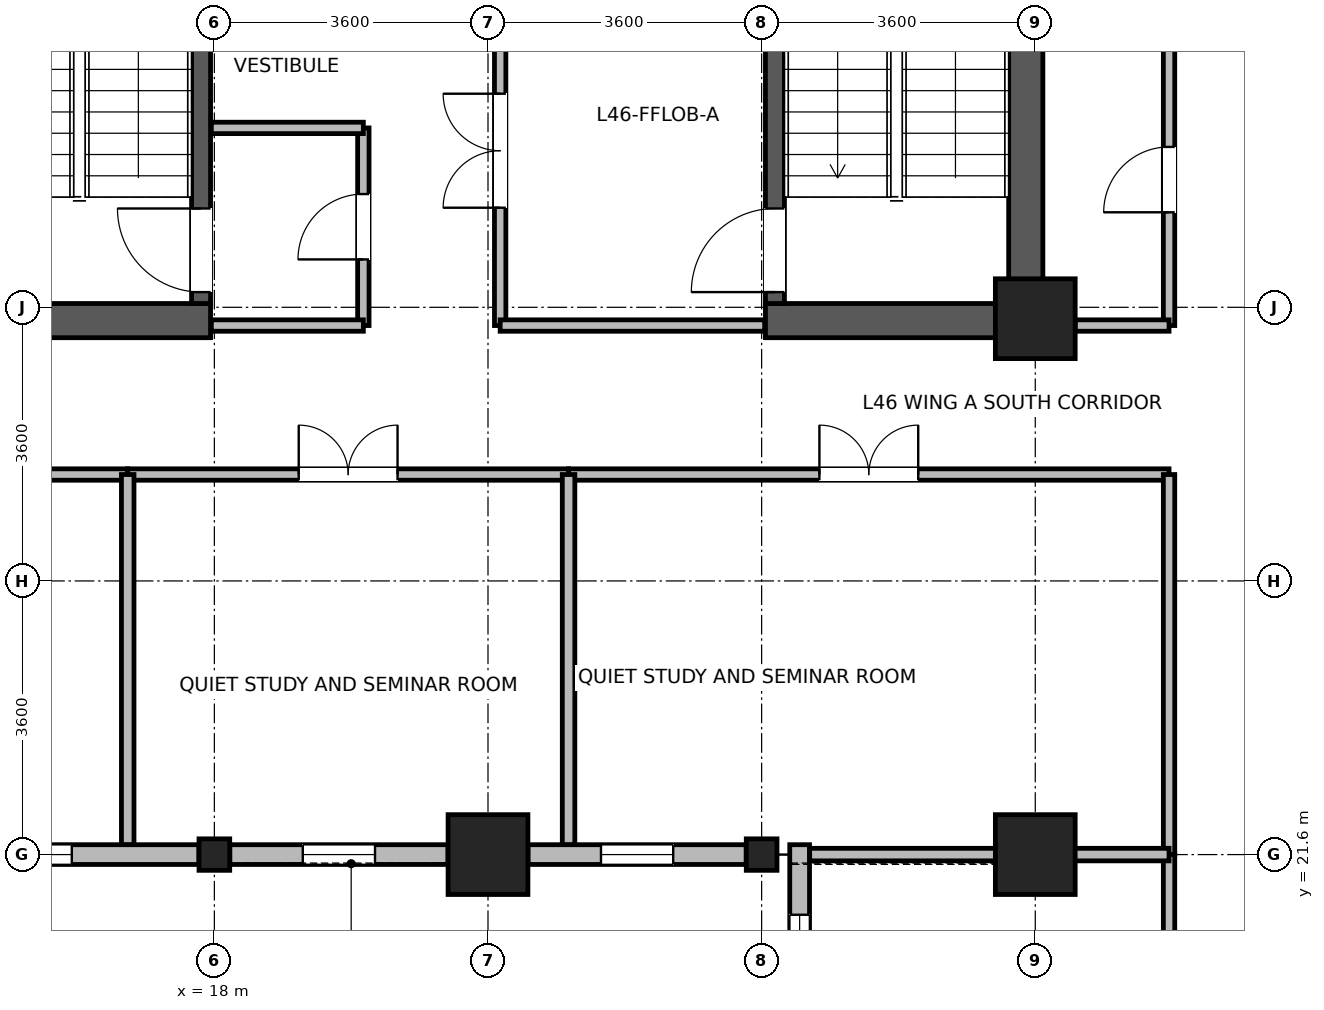
"""IFC4 building model, lengths in metres.
Left out: names, types, materials, properties, quantities, classifications, styles, units other than length and angle.
Written with IfcOpenShell. Run it as: python <this file> out.ifc"""

import sys

from ifc_helpers import new_model, si_unit, direction, frame, frame_2d, origin, origin_2d, place, context, subcontext, project, spatial, rectangle, i_section, extrude, source, transform, mapped, element, fill, save


model = new_model("IFC4")
c1 = context("Model", 3, precision=1e-05, world=origin(), true_north=direction((0.0, 1.0)))
c2 = subcontext(c1, "Body", "Model", "MODEL_VIEW")
j1 = project(units=[si_unit("LENGTHUNIT", "METRE"), si_unit("PLANEANGLEUNIT", "RADIAN")], contexts=[c1])
p1 = place(None, origin())
s1 = spatial("IfcSite", under=j1, at=p1, CompositionType="ELEMENT")
p2 = place(p1, origin())
s2 = spatial("IfcBuilding", under=s1, at=p2, CompositionType="ELEMENT")
p3 = place(p2, frame((0.0, 0.0, 180.9)))
s3 = spatial("IfcBuildingStorey", under=s2, at=p3, CompositionType="ELEMENT", Elevation=180.9)
p4 = place(p3, frame((28.675, 28.4, 0.0), z_axis=(0.0, 0.0, 1.0), x_axis=(0.0, 1.0, 0.0)))
e1 = element("IfcWall", 1, at=p4, inside=s3, PredefinedType="SHEAR", context=c2, shape_type="SweptSolid", body=[
    extrude(rectangle(XDim=7.9, YDim=0.45, at=frame_2d((3.95, 0.0))), origin(), (0.0, 0.0, 1.0), 3.46),
])
for number, where, z_axis, x_axis in (
    (2, (14.75, 28.625, 0.0), (0.0, 0.0, 1.0), (1.0, 0.0, 0.0)),
    (3, (25.25, 28.625, 0.0), (0.0, 0.0, 1.0), (1.0, 0.0, 0.0)),
):
    element("IfcWall", number, at=place(p3, frame(where, z_axis=z_axis, x_axis=x_axis)), inside=s3, PredefinedType="SHEAR", context=c2, shape_type="SweptSolid", body=[
        extrude(rectangle(XDim=3.2, YDim=0.45, at=frame_2d((1.6, 0.0))), origin(), (0.0, 0.0, 1.0), 3.46),
    ])
p5 = place(p3, frame((17.825, 28.85, 0.0), z_axis=(0.0, 0.0, 1.0), x_axis=(0.0, 1.0, 0.0)))
e4 = element("IfcWall", 4, at=p5, inside=s3, PredefinedType="SHEAR", context=c2, shape_type="SweptSolid", body=[
    extrude(rectangle(XDim=7.0, YDim=0.25, at=frame_2d((3.5, 0.0))), origin(), (0.0, 0.0, 1.0), 3.46),
])
p6 = place(p5, frame((0.15, 0.0, 0.0)))
e5 = element("IfcOpeningElement", 5, at=p6, cuts=e4, PredefinedType="OPENING", context=c2, shape_type="SweptSolid", body=[
    extrude(rectangle(XDim=1.1, YDim=2.08, at=frame_2d((0.55, 1.04))), frame((0.0, 0.135, 0.0), z_axis=(0.0, -1.0, 0.0), x_axis=(1.0, 0.0, 0.0)), (0.0, 0.0, 1.0), 0.27),
])
p7 = place(p3, frame((25.375, 28.85, 0.0), z_axis=(0.0, 0.0, 1.0), x_axis=(0.0, 1.0, 0.0)))
e6 = element("IfcWall", 6, at=p7, inside=s3, PredefinedType="SHEAR", context=c2, shape_type="SweptSolid", body=[
    extrude(rectangle(XDim=7.0, YDim=0.25, at=frame_2d((3.5, 0.0))), origin(), (0.0, 0.0, 1.0), 3.46),
])
p8 = place(p7, frame((0.15, 0.0, 0.0)))
e7 = element("IfcOpeningElement", 7, at=p8, cuts=e6, PredefinedType="OPENING", context=c2, shape_type="SweptSolid", body=[
    extrude(rectangle(XDim=1.1, YDim=2.08, at=frame_2d((0.55, 1.04))), frame((0.0, 0.135, 0.0), z_axis=(0.0, -1.0, 0.0), x_axis=(1.0, 0.0, 0.0)), (0.0, 0.0, 1.0), 0.27),
])
m1 = source(origin(), c2, "Body", "SweptSolid", [
    extrude(rectangle(XDim=1.05, YDim=1.05, at=origin_2d()), origin(), (0.0, 0.0, 1.0), 3.7),
])
for number, where, z_axis, x_axis in (
    (8, (21.6, 21.6, 0.0), (0.0, 0.0, 1.0), (1.0, 0.0, 0.0)),
    (9, (28.8, 21.6, 0.0), (0.0, 0.0, 1.0), (1.0, 0.0, 0.0)),
    (10, (28.8, 28.65, 0.0), (0.0, 0.0, 1.0), (1.0, 0.0, 0.0)),
):
    element("IfcColumn", number, at=place(p3, frame(where, z_axis=z_axis, x_axis=x_axis)), inside=s3, PredefinedType="COLUMN", context=c2, shape_type="MappedRepresentation", body=[
        mapped(m1, transform((0.0, 0.0, 0.0), x_axis=(1.0, 0.0, 0.0), y_axis=(0.0, 1.0, 0.0), z_axis=(0.0, 0.0, 1.0), scale=1.0)),
    ])
m2 = source(origin(), c2, "Body", "SweptSolid", [
    extrude(i_section(OverallWidth=0.404, OverallDepth=0.414, WebThickness=0.021, FlangeThickness=0.028, FilletRadius=0.015, at=origin_2d()), origin(), (0.0, 0.0, 1.0), 3.7),
])
for number, where, z_axis, x_axis in (
    (11, (18.0, 21.6, 0.0), (0.0, 0.0, 1.0), (1.0, 0.0, 0.0)),
    (12, (25.2, 21.6, 0.0), (0.0, 0.0, 1.0), (1.0, 0.0, 0.0)),
):
    element("IfcColumn", number, at=place(p3, frame(where, z_axis=z_axis, x_axis=x_axis)), inside=s3, PredefinedType="COLUMN", context=c2, shape_type="MappedRepresentation", body=[
        mapped(m2, transform((0.0, 0.0, 0.0), x_axis=(1.0, 0.0, 0.0), y_axis=(0.0, 1.0, 0.0), z_axis=(0.0, 0.0, 1.0), scale=1.0)),
    ])
p9 = place(p3, frame((17.797, 21.6, 0.0), z_axis=(0.0, 0.0, 1.0), x_axis=(-1.0, 0.0, 0.0)))
e13 = element("IfcWall", 13, at=p9, inside=s3, PredefinedType="STANDARD", context=c2, shape_type="SweptSolid", body=[
    extrude(rectangle(XDim=2.871, YDim=0.26, at=frame_2d((1.436, 0.0))), origin(), (0.0, 0.0, 1.0), 2.99),
])
p10 = place(p9, frame((1.673, 0.0, 0.85)))
e14 = element("IfcOpeningElement", 14, at=p10, cuts=e13, PredefinedType="OPENING", context=c2, shape_type="SweptSolid", body=[
    extrude(rectangle(XDim=0.95, YDim=1.75, at=frame_2d((0.475, 0.875))), frame((0.0, 0.14, 0.0), z_axis=(0.0, -1.0, 0.0), x_axis=(1.0, 0.0, 0.0)), (0.0, 0.0, 1.0), 0.28),
])
p11 = place(p3, frame((21.074, 21.6, 0.0), z_axis=(0.0, 0.0, 1.0), x_axis=(-1.0, 0.0, 0.0)))
e15 = element("IfcWall", 15, at=p11, inside=s3, PredefinedType="STANDARD", context=c2, shape_type="SweptSolid", body=[
    extrude(rectangle(XDim=2.871, YDim=0.26, at=frame_2d((1.436, 0.0))), origin(), (0.0, 0.0, 1.0), 2.99),
])
p12 = place(p11, frame((0.96, 0.0, 0.85)))
e16 = element("IfcOpeningElement", 16, at=p12, cuts=e15, PredefinedType="OPENING", context=c2, shape_type="SweptSolid", body=[
    extrude(rectangle(XDim=0.95, YDim=1.75, at=frame_2d((0.475, 0.875))), frame((0.0, 0.14, 0.0), z_axis=(0.0, -1.0, 0.0), x_axis=(1.0, 0.0, 0.0)), (0.0, 0.0, 1.0), 0.28),
])
p13 = place(p3, frame((24.997, 21.6, 0.0), z_axis=(0.0, 0.0, 1.0), x_axis=(-1.0, 0.0, 0.0)))
e17 = element("IfcWall", 17, at=p13, inside=s3, PredefinedType="STANDARD", context=c2, shape_type="SweptSolid", body=[
    extrude(rectangle(XDim=2.871, YDim=0.26, at=frame_2d((1.436, 0.0))), origin(), (0.0, 0.0, 1.0), 2.99),
])
p14 = place(p13, frame((0.96, 0.0, 0.85)))
e18 = element("IfcOpeningElement", 18, at=p14, cuts=e17, PredefinedType="OPENING", context=c2, shape_type="SweptSolid", body=[
    extrude(rectangle(XDim=0.95, YDim=1.75, at=frame_2d((0.475, 0.875))), frame((0.0, 0.14, 0.0), z_axis=(0.0, -1.0, 0.0), x_axis=(1.0, 0.0, 0.0)), (0.0, 0.0, 1.0), 0.28),
])
p15 = place(p3, frame((25.7, 1.67, 0.0), z_axis=(0.0, 0.0, 1.0), x_axis=(0.0, 1.0, 0.0)))
e19 = element("IfcWall", 19, at=p15, inside=s3, PredefinedType="STANDARD", context=c2, shape_type="SweptSolid", body=[
    extrude(rectangle(XDim=20.06, YDim=0.26, at=frame_2d((10.03, 0.0))), origin(), (0.0, 0.0, 1.0), 3.44),
])
p16 = place(p15, frame((0.922, 0.0, 0.85)))
e20 = element("IfcOpeningElement", 20, at=p16, cuts=e19, PredefinedType="OPENING", context=c2, shape_type="SweptSolid", body=[
    extrude(rectangle(XDim=1.5, YDim=1.85, at=frame_2d((0.75, 0.925))), frame((0.0, 0.14, 0.0), z_axis=(0.0, -1.0, 0.0), x_axis=(1.0, 0.0, 0.0)), (0.0, 0.0, 1.0), 0.28),
])
p17 = place(p15, frame((7.608, 0.0, 0.85)))
e21 = element("IfcOpeningElement", 21, at=p17, cuts=e19, PredefinedType="OPENING", context=c2, shape_type="SweptSolid", body=[
    extrude(rectangle(XDim=1.5, YDim=1.85, at=frame_2d((0.75, 0.925))), frame((0.0, 0.14, 0.0), z_axis=(0.0, -1.0, 0.0), x_axis=(1.0, 0.0, 0.0)), (0.0, 0.0, 1.0), 0.28),
])
p18 = place(p15, frame((10.952, 0.0, 0.85)))
e22 = element("IfcOpeningElement", 22, at=p18, cuts=e19, PredefinedType="OPENING", context=c2, shape_type="SweptSolid", body=[
    extrude(rectangle(XDim=1.5, YDim=1.85, at=frame_2d((0.75, 0.925))), frame((0.0, 0.14, 0.0), z_axis=(0.0, -1.0, 0.0), x_axis=(1.0, 0.0, 0.0)), (0.0, 0.0, 1.0), 0.28),
])
p19 = place(p15, frame((14.295, 0.0, 0.85)))
e23 = element("IfcOpeningElement", 23, at=p19, cuts=e19, PredefinedType="OPENING", context=c2, shape_type="SweptSolid", body=[
    extrude(rectangle(XDim=1.5, YDim=1.85, at=frame_2d((0.75, 0.925))), frame((0.0, 0.14, 0.0), z_axis=(0.0, -1.0, 0.0), x_axis=(1.0, 0.0, 0.0)), (0.0, 0.0, 1.0), 0.28),
])
p20 = place(p15, frame((17.638, 0.0, 0.85)))
e24 = element("IfcOpeningElement", 24, at=p20, cuts=e19, PredefinedType="OPENING", context=c2, shape_type="SweptSolid", body=[
    extrude(rectangle(XDim=1.5, YDim=1.85, at=frame_2d((0.75, 0.925))), frame((0.0, 0.14, 0.0), z_axis=(0.0, -1.0, 0.0), x_axis=(1.0, 0.0, 0.0)), (0.0, 0.0, 1.0), 0.28),
])
p21 = place(p3, frame((6.54, 26.6, 0.0), z_axis=(0.0, 0.0, 1.0), x_axis=(1.0, 0.0, 0.0)))
e25 = element("IfcWall", 25, at=p21, inside=s3, PredefinedType="PARTITIONING", context=c2, shape_type="SweptSolid", body=[
    extrude(rectangle(XDim=10.32, YDim=0.15, at=frame_2d((5.16, 0.0))), origin(), (0.0, 0.0, 1.0), 3.44),
])
p22 = place(p21, frame((4.51, 0.0, 0.0)))
e26 = element("IfcOpeningElement", 26, at=p22, cuts=e25, PredefinedType="OPENING", context=c2, shape_type="SweptSolid", body=[
    extrude(rectangle(XDim=1.3, YDim=2.12, at=frame_2d((0.65, 1.06))), frame((0.0, 0.085, 0.0), z_axis=(0.0, -1.0, 0.0), x_axis=(1.0, 0.0, 0.0)), (0.0, 0.0, 1.0), 0.17),
])
p23 = place(p3, frame((22.66, 26.6, 0.0), z_axis=(0.0, 0.0, 1.0), x_axis=(1.0, 0.0, 0.0)))
e27 = element("IfcWall", 27, at=p23, inside=s3, PredefinedType="PARTITIONING", context=c2, shape_type="SweptSolid", body=[
    extrude(rectangle(XDim=7.9, YDim=0.15, at=frame_2d((3.95, 0.0))), origin(), (0.0, 0.0, 1.0), 3.44),
])
p24 = place(p23, frame((3.3, 0.0, 0.0)))
e28 = element("IfcOpeningElement", 28, at=p24, cuts=e27, PredefinedType="OPENING", context=c2, shape_type="SweptSolid", body=[
    extrude(rectangle(XDim=1.3, YDim=2.12, at=frame_2d((0.65, 1.06))), frame((0.0, 0.085, 0.0), z_axis=(0.0, -1.0, 0.0), x_axis=(1.0, 0.0, 0.0)), (0.0, 0.0, 1.0), 0.17),
])
p25 = place(p3, frame((30.56, 14.5, 0.0), z_axis=(0.0, 0.0, 1.0), x_axis=(0.0, 1.0, 0.0)))
e29 = element("IfcWall", 29, at=p25, inside=s3, PredefinedType="PARTITIONING", context=c2, shape_type="SweptSolid", body=[
    extrude(rectangle(XDim=7.1, YDim=0.15, at=frame_2d((3.55, 0.0))), origin(), (0.0, 0.0, 1.0), 3.44),
])
p26 = place(p25, frame((2.9, 0.0, 0.0)))
e30 = element("IfcOpeningElement", 30, at=p26, cuts=e29, PredefinedType="OPENING", context=c2, shape_type="SweptSolid", body=[
    extrude(rectangle(XDim=1.3, YDim=2.12, at=frame_2d((0.65, 1.06))), frame((0.0, 0.085, 0.0), z_axis=(0.0, -1.0, 0.0), x_axis=(1.0, 0.0, 0.0)), (0.0, 0.0, 1.0), 0.17),
])
p27 = place(p3, frame((16.86, 26.6, 0.0), z_axis=(0.0, 0.0, 1.0), x_axis=(1.0, 0.0, 0.0)))
e31 = element("IfcWall", 31, at=p27, inside=s3, PredefinedType="PARTITIONING", context=c2, shape_type="SweptSolid", body=[
    extrude(rectangle(XDim=5.8, YDim=0.15, at=frame_2d((2.9, 0.0))), origin(), (0.0, 0.0, 1.0), 3.44),
])
p28 = place(p27, frame((2.25, 0.0, 0.0)))
e32 = element("IfcOpeningElement", 32, at=p28, cuts=e31, PredefinedType="OPENING", context=c2, shape_type="SweptSolid", body=[
    extrude(rectangle(XDim=1.3, YDim=2.12, at=frame_2d((0.65, 1.06))), frame((0.0, 0.085, 0.0), z_axis=(0.0, -1.0, 0.0), x_axis=(1.0, 0.0, 0.0)), (0.0, 0.0, 1.0), 0.17),
])
p29 = place(p3, frame((30.56, 21.6, 0.0), z_axis=(0.0, 0.0, 1.0), x_axis=(0.0, 1.0, 0.0)))
e33 = element("IfcWall", 33, at=p29, inside=s3, PredefinedType="PARTITIONING", context=c2, shape_type="SweptSolid", body=[
    extrude(rectangle(XDim=5.0, YDim=0.15, at=frame_2d((2.5, 0.0))), origin(), (0.0, 0.0, 1.0), 3.44),
])
p30 = place(p3, frame((30.56, 28.56, 0.0), z_axis=(0.0, 0.0, 1.0), x_axis=(0.0, 1.0, 0.0)))
e34 = element("IfcWall", 34, at=p30, inside=s3, PredefinedType="PARTITIONING", context=c2, shape_type="SweptSolid", body=[
    extrude(rectangle(XDim=3.84, YDim=0.15, at=frame_2d((1.92, 0.0))), origin(), (0.0, 0.0, 1.0), 3.44),
])
p31 = place(p30, frame((1.49, 0.0, 0.0)))
e35 = element("IfcOpeningElement", 35, at=p31, cuts=e34, PredefinedType="OPENING", context=c2, shape_type="SweptSolid", body=[
    extrude(rectangle(XDim=0.86, YDim=2.02, at=frame_2d((0.43, 1.01))), frame((0.0, 0.085, 0.0), z_axis=(0.0, -1.0, 0.0), x_axis=(1.0, 0.0, 0.0)), (0.0, 0.0, 1.0), 0.17),
])
p32 = place(p3, frame((19.96, 28.56, 0.0), z_axis=(0.0, 0.0, 1.0), x_axis=(0.0, 1.0, 0.0)))
e36 = element("IfcWall", 36, at=p32, inside=s3, PredefinedType="PARTITIONING", context=c2, shape_type="SweptSolid", body=[
    extrude(rectangle(XDim=2.6, YDim=0.15, at=frame_2d((1.3, 0.0))), origin(), (0.0, 0.0, 1.0), 3.44),
])
p33 = place(p32, frame((0.87, 0.0, 0.0)))
e37 = element("IfcOpeningElement", 37, at=p33, cuts=e36, PredefinedType="OPENING", context=c2, shape_type="SweptSolid", body=[
    extrude(rectangle(XDim=0.86, YDim=2.02, at=frame_2d((0.43, 1.01))), frame((0.0, 0.085, 0.0), z_axis=(0.0, -1.0, 0.0), x_axis=(1.0, 0.0, 0.0)), (0.0, 0.0, 1.0), 0.17),
])
p34 = place(p3, frame((17.96, 28.56, 0.0), z_axis=(0.0, 0.0, 1.0), x_axis=(1.0, 0.0, 0.0)))
e38 = element("IfcWall", 38, at=p34, inside=s3, PredefinedType="PARTITIONING", context=c2, shape_type="SweptSolid", body=[
    extrude(rectangle(XDim=2.0, YDim=0.15, at=frame_2d((1.0, 0.0))), origin(), (0.0, 0.0, 1.0), 2.44),
])
p35 = place(p3, frame((17.96, 31.16, 0.0), z_axis=(0.0, 0.0, 1.0), x_axis=(1.0, 0.0, 0.0)))
e39 = element("IfcWall", 39, at=p35, inside=s3, PredefinedType="PARTITIONING", context=c2, shape_type="SweptSolid", body=[
    extrude(rectangle(XDim=2.0, YDim=0.15, at=frame_2d((1.0, 0.0))), origin(), (0.0, 0.0, 1.0), 3.44),
])
p36 = place(p3, frame((29.325, 28.56, 0.0), z_axis=(0.0, 0.0, 1.0), x_axis=(1.0, 0.0, 0.0)))
e40 = element("IfcWall", 40, at=p36, inside=s3, PredefinedType="PARTITIONING", context=c2, shape_type="SweptSolid", body=[
    extrude(rectangle(XDim=1.235, YDim=0.15, at=frame_2d((0.618, 0.0))), origin(), (0.0, 0.0, 1.0), 2.84),
])
for number, where, z_axis, x_axis in (
    (41, (16.86, 21.732, 0.0), (0.0, 0.0, 1.0), (0.0, 1.0, 0.0)),
    (42, (22.66, 21.732, 0.0), (0.0, 0.0, 1.0), (0.0, 1.0, 0.0)),
):
    element("IfcWall", number, at=place(p3, frame(where, z_axis=z_axis, x_axis=x_axis)), inside=s3, PredefinedType="PARTITIONING", context=c2, shape_type="SweptSolid", body=[
        extrude(rectangle(XDim=4.868, YDim=0.165, at=frame_2d((2.434, 0.0))), origin(), (0.0, 0.0, 1.0), 3.44),
    ])
p37 = place(p3, frame((25.832, 21.6, 0.0), z_axis=(0.0, 0.0, 1.0), x_axis=(1.0, 0.0, 0.0)))
e43 = element("IfcWall", 43, at=p37, inside=s3, PredefinedType="PARTITIONING", context=c2, shape_type="SweptSolid", body=[
    extrude(rectangle(XDim=4.728, YDim=0.165, at=frame_2d((2.364, 0.0))), origin(), (0.0, 0.0, 1.0), 2.99),
])
p38 = place(p3, frame((21.76, 28.56, 0.0), z_axis=(0.0, 0.0, 1.0), x_axis=(0.0, 1.0, 0.0)))
e44 = element("IfcWall", 44, at=p38, inside=s3, PredefinedType="PARTITIONING", context=c2, shape_type="SweptSolid", body=[
    extrude(rectangle(XDim=4.6, YDim=0.15, at=frame_2d((2.3, 0.0))), origin(), (0.0, 0.0, 1.0), 3.44),
])
p39 = place(p38, frame((1.55, 0.0, 0.0)))
e45 = element("IfcOpeningElement", 45, at=p39, cuts=e44, PredefinedType="OPENING", context=c2, shape_type="SweptSolid", body=[
    extrude(rectangle(XDim=1.5, YDim=2.1, at=frame_2d((0.75, 1.05))), frame((0.0, 0.085, 0.0), z_axis=(0.0, -1.0, 0.0), x_axis=(1.0, 0.0, 0.0)), (0.0, 0.0, 1.0), 0.17),
])
p40 = place(p3, frame((21.76, 28.56, 0.0), z_axis=(0.0, 0.0, 1.0), x_axis=(1.0, 0.0, 0.0)))
e46 = element("IfcWall", 46, at=p40, inside=s3, PredefinedType="PARTITIONING", context=c2, shape_type="SweptSolid", body=[
    extrude(rectangle(XDim=3.48, YDim=0.15, at=frame_2d((1.74, 0.0))), origin(), (0.0, 0.0, 1.0), 2.44),
])
p41 = place(p10, origin())
e47 = element("IfcWindow", 47, at=p41, inside=s3, PartitioningType="SINGLE_PANEL", PredefinedType="WINDOW", context=c2, shape_type="SweptSolid", body=[
    extrude(rectangle(XDim=0.95, YDim=1.75, at=frame_2d((0.475, 0.875))), frame((0.0, 0.03, 0.0), z_axis=(0.0, -1.0, 0.0), x_axis=(1.0, 0.0, 0.0)), (0.0, 0.0, 1.0), 0.06),
])
fill(e14, e47)
p42 = place(p12, origin())
e48 = element("IfcWindow", 48, at=p42, inside=s3, PartitioningType="SINGLE_PANEL", PredefinedType="WINDOW", context=c2, shape_type="SweptSolid", body=[
    extrude(rectangle(XDim=0.95, YDim=1.75, at=frame_2d((0.475, 0.875))), frame((0.0, 0.03, 0.0), z_axis=(0.0, -1.0, 0.0), x_axis=(1.0, 0.0, 0.0)), (0.0, 0.0, 1.0), 0.06),
])
fill(e16, e48)
p43 = place(p14, origin())
e49 = element("IfcWindow", 49, at=p43, inside=s3, PartitioningType="SINGLE_PANEL", PredefinedType="WINDOW", context=c2, shape_type="SweptSolid", body=[
    extrude(rectangle(XDim=0.95, YDim=1.75, at=frame_2d((0.475, 0.875))), frame((0.0, 0.03, 0.0), z_axis=(0.0, -1.0, 0.0), x_axis=(1.0, 0.0, 0.0)), (0.0, 0.0, 1.0), 0.06),
])
fill(e18, e49)
p44 = place(p20, origin())
e50 = element("IfcWindow", 50, at=p44, inside=s3, PartitioningType="SINGLE_PANEL", PredefinedType="WINDOW", context=c2, shape_type="SweptSolid", body=[
    extrude(rectangle(XDim=1.5, YDim=1.85, at=frame_2d((0.75, 0.925))), frame((0.0, 0.03, 0.0), z_axis=(0.0, -1.0, 0.0), x_axis=(1.0, 0.0, 0.0)), (0.0, 0.0, 1.0), 0.06),
])
fill(e24, e50)
p45 = place(p6, origin())
e51 = element("IfcDoor", 51, at=p45, inside=s3, OperationType="SINGLE_SWING_RIGHT", PredefinedType="DOOR", context=c2, shape_type="SweptSolid", body=[
    extrude(rectangle(XDim=1.1, YDim=2.08, at=frame_2d((0.55, 1.04))), frame((0.0, 0.025, 0.0), z_axis=(0.0, -1.0, 0.0), x_axis=(1.0, 0.0, 0.0)), (0.0, 0.0, 1.0), 0.05),
])
fill(e5, e51)
p46 = place(p8, origin())
e52 = element("IfcDoor", 52, at=p46, inside=s3, OperationType="SINGLE_SWING_LEFT", PredefinedType="DOOR", context=c2, shape_type="SweptSolid", body=[
    extrude(rectangle(XDim=1.1, YDim=2.08, at=frame_2d((0.55, 1.04))), frame((0.0, 0.025, 0.0), z_axis=(0.0, -1.0, 0.0), x_axis=(1.0, 0.0, 0.0)), (0.0, 0.0, 1.0), 0.05),
])
fill(e7, e52)
p47 = place(p24, origin())
e53 = element("IfcDoor", 53, at=p47, inside=s3, OperationType="DOUBLE_DOOR_SINGLE_SWING", PredefinedType="DOOR", context=c2, shape_type="SweptSolid", body=[
    extrude(rectangle(XDim=1.3, YDim=2.12, at=frame_2d((0.65, 1.06))), frame((0.0, 0.025, 0.0), z_axis=(0.0, -1.0, 0.0), x_axis=(1.0, 0.0, 0.0)), (0.0, 0.0, 1.0), 0.05),
])
fill(e28, e53)
p48 = place(p28, origin())
e54 = element("IfcDoor", 54, at=p48, inside=s3, OperationType="DOUBLE_DOOR_SINGLE_SWING", PredefinedType="DOOR", context=c2, shape_type="SweptSolid", body=[
    extrude(rectangle(XDim=1.3, YDim=2.12, at=frame_2d((0.65, 1.06))), frame((0.0, 0.025, 0.0), z_axis=(0.0, -1.0, 0.0), x_axis=(1.0, 0.0, 0.0)), (0.0, 0.0, 1.0), 0.05),
])
fill(e32, e54)
p49 = place(p31, origin())
e55 = element("IfcDoor", 55, at=p49, inside=s3, OperationType="SINGLE_SWING_LEFT", PredefinedType="DOOR", context=c2, shape_type="SweptSolid", body=[
    extrude(rectangle(XDim=0.86, YDim=2.02, at=frame_2d((0.43, 1.01))), frame((0.0, 0.025, 0.0), z_axis=(0.0, -1.0, 0.0), x_axis=(1.0, 0.0, 0.0)), (0.0, 0.0, 1.0), 0.05),
])
fill(e35, e55)
p50 = place(p33, origin())
e56 = element("IfcDoor", 56, at=p50, inside=s3, OperationType="SINGLE_SWING_LEFT", PredefinedType="DOOR", context=c2, shape_type="SweptSolid", body=[
    extrude(rectangle(XDim=0.86, YDim=2.02, at=frame_2d((0.43, 1.01))), frame((0.0, 0.025, 0.0), z_axis=(0.0, -1.0, 0.0), x_axis=(1.0, 0.0, 0.0)), (0.0, 0.0, 1.0), 0.05),
])
fill(e37, e56)
p51 = place(p39, origin())
e57 = element("IfcDoor", 57, at=p51, inside=s3, OperationType="DOUBLE_DOOR_SINGLE_SWING", PredefinedType="DOOR", context=c2, shape_type="SweptSolid", body=[
    extrude(rectangle(XDim=1.5, YDim=2.1, at=frame_2d((0.75, 1.05))), frame((0.0, 0.025, 0.0), z_axis=(0.0, -1.0, 0.0), x_axis=(1.0, 0.0, 0.0)), (0.0, 0.0, 1.0), 0.05),
])
fill(e45, e57)
save(model, sys.argv[1])
